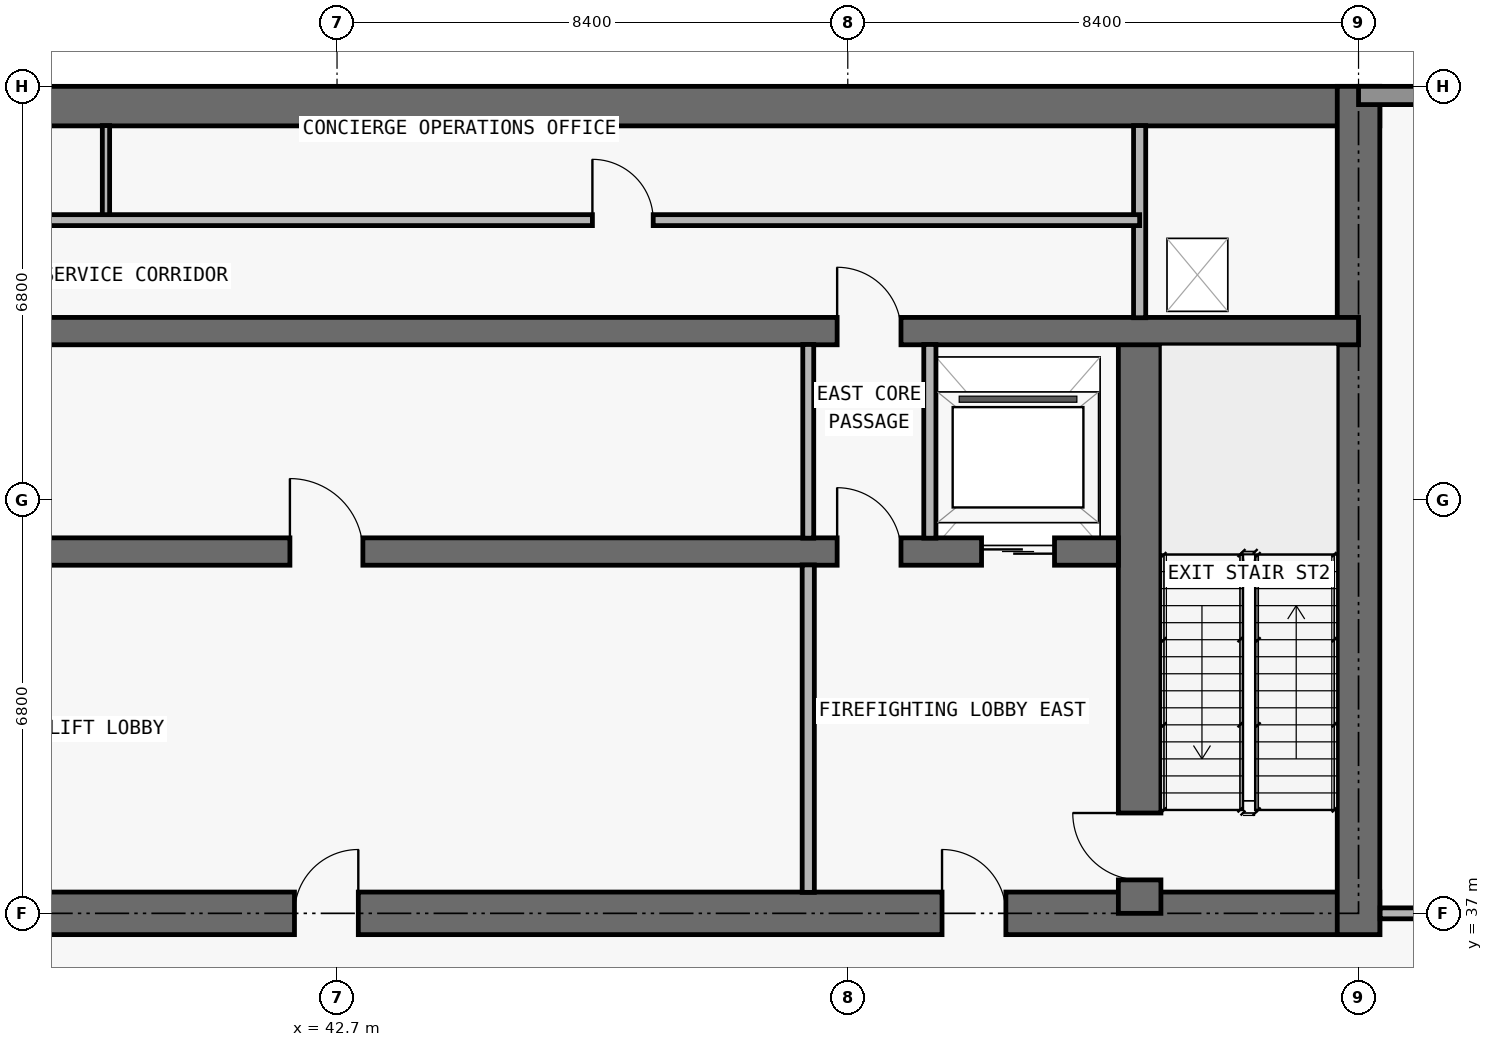
"""IFC4 building model, lengths in metres.
Left out: names, types, materials, properties, quantities, classifications, styles, units other than length and angle.
Written with IfcOpenShell. Run it as: python <this file> out.ifc"""

import sys

from ifc_helpers import new_model, si_unit, direction, frame, frame_2d, origin, place, context, subcontext, project, spatial, rectangle, extrude, element, fill, save


model = new_model("IFC4")
c1 = context("Model", 3, precision=1e-05, world=origin(), true_north=direction((0.0, 1.0)))
c2 = subcontext(c1, "Body", "Model", "MODEL_VIEW")
j1 = project(units=[si_unit("LENGTHUNIT", "METRE"), si_unit("PLANEANGLEUNIT", "RADIAN")], contexts=[c1])
p1 = place(None, origin())
s1 = spatial("IfcSite", under=j1, at=p1, CompositionType="ELEMENT")
p2 = place(p1, origin())
s2 = spatial("IfcBuilding", under=s1, at=p2, CompositionType="ELEMENT")
p3 = place(p2, frame((0.0, 0.0, 279.4)))
s3 = spatial("IfcBuildingStorey", under=s2, at=p3, CompositionType="ELEMENT", Elevation=279.4)
p4 = place(p3, frame((17.95, 37.0, 0.0), z_axis=(0.0, 0.0, 1.0), x_axis=(1.0, 0.0, 0.0)))
e1 = element("IfcWall", 1, at=p4, inside=s3, PredefinedType="SHEAR", context=c2, shape_type="SweptSolid", body=[
    extrude(rectangle(XDim=41.9, YDim=0.7, at=frame_2d((20.95, 0.0))), origin(), (0.0, 0.0, 1.0), 5.1),
])
p5 = place(p4, frame((14.312, 0.0, 0.0)))
e2 = element("IfcOpeningElement", 2, at=p5, cuts=e1, PredefinedType="OPENING", context=c2, shape_type="SweptSolid", body=[
    extrude(rectangle(XDim=1.2, YDim=2.2, at=frame_2d((0.6, 1.1))), frame((0.0, 0.36, 0.0), z_axis=(0.0, -1.0, 0.0), x_axis=(1.0, 0.0, 0.0)), (0.0, 0.0, 1.0), 0.72),
])
p6 = place(p4, frame((6.2, 0.0, 0.0)))
e3 = element("IfcOpeningElement", 3, at=p6, cuts=e1, PredefinedType="OPENING", context=c2, shape_type="SweptSolid", body=[
    extrude(rectangle(XDim=1.05, YDim=2.15, at=frame_2d((0.525, 1.075))), frame((0.0, 0.36, 0.0), z_axis=(0.0, -1.0, 0.0), x_axis=(1.0, 0.0, 0.0)), (0.0, 0.0, 1.0), 0.72),
])
p7 = place(p4, frame((34.7, 0.0, 0.0)))
e4 = element("IfcOpeningElement", 4, at=p7, cuts=e1, PredefinedType="OPENING", context=c2, shape_type="SweptSolid", body=[
    extrude(rectangle(XDim=1.05, YDim=2.15, at=frame_2d((0.525, 1.075))), frame((0.0, 0.36, 0.0), z_axis=(0.0, -1.0, 0.0), x_axis=(1.0, 0.0, 0.0)), (0.0, 0.0, 1.0), 0.72),
])
p8 = place(p4, frame((10.812, 0.0, 0.0)))
e5 = element("IfcOpeningElement", 5, at=p8, cuts=e1, PredefinedType="OPENING", context=c2, shape_type="SweptSolid", body=[
    extrude(rectangle(XDim=1.05, YDim=2.15, at=frame_2d((0.525, 1.075))), frame((0.0, 0.36, 0.0), z_axis=(0.0, -1.0, 0.0), x_axis=(1.0, 0.0, 0.0)), (0.0, 0.0, 1.0), 0.72),
])
p9 = place(p4, frame((24.05, 0.0, 0.0)))
e6 = element("IfcOpeningElement", 6, at=p9, cuts=e1, PredefinedType="OPENING", context=c2, shape_type="SweptSolid", body=[
    extrude(rectangle(XDim=1.05, YDim=2.15, at=frame_2d((0.525, 1.075))), frame((0.0, 0.36, 0.0), z_axis=(0.0, -1.0, 0.0), x_axis=(1.0, 0.0, 0.0)), (0.0, 0.0, 1.0), 0.72),
])
p10 = place(p3, frame((17.95, 50.275, 0.0), z_axis=(0.0, 0.0, 1.0), x_axis=(1.0, 0.0, 0.0)))
e7 = element("IfcWall", 7, at=p10, inside=s3, PredefinedType="SHEAR", context=c2, shape_type="SweptSolid", body=[
    extrude(rectangle(XDim=41.9, YDim=0.65, at=frame_2d((20.95, 0.0))), origin(), (0.0, 0.0, 1.0), 5.1),
])
p11 = place(p3, frame((59.5, 36.65, 0.0), z_axis=(0.0, 0.0, 1.0), x_axis=(0.0, 1.0, 0.0)))
e8 = element("IfcWall", 8, at=p11, inside=s3, PredefinedType="SHEAR", context=c2, shape_type="SweptSolid", body=[
    extrude(rectangle(XDim=13.95, YDim=0.7, at=frame_2d((6.975, 0.0))), origin(), (0.0, 0.0, 1.0), 5.1),
])
p12 = place(p3, frame((55.9, 37.0, 0.0), z_axis=(0.0, 0.0, 1.0), x_axis=(0.0, 1.0, 0.0)))
e9 = element("IfcWall", 9, at=p12, inside=s3, PredefinedType="SHEAR", context=c2, shape_type="SweptSolid", body=[
    extrude(rectangle(XDim=9.575, YDim=0.7, at=frame_2d((4.788, 0.0))), origin(), (0.0, 0.0, 1.0), 5.1),
])
p13 = place(p12, frame((0.55, 0.0, 0.0)))
e10 = element("IfcOpeningElement", 10, at=p13, cuts=e9, PredefinedType="OPENING", context=c2, shape_type="SweptSolid", body=[
    extrude(rectangle(XDim=1.1, YDim=2.15, at=frame_2d((0.55, 1.075))), frame((0.0, 0.36, 0.0), z_axis=(0.0, -1.0, 0.0), x_axis=(1.0, 0.0, 0.0)), (0.0, 0.0, 1.0), 0.72),
])
p14 = place(p3, frame((22.25, 42.95, 0.0), z_axis=(0.0, 0.0, 1.0), x_axis=(1.0, 0.0, 0.0)))
e11 = element("IfcWall", 11, at=p14, inside=s3, PredefinedType="SHEAR", context=c2, shape_type="SweptSolid", body=[
    extrude(rectangle(XDim=33.3, YDim=0.45, at=frame_2d((16.65, 0.0))), origin(), (0.0, 0.0, 1.0), 5.1),
])
p15 = place(p14, frame((1.05, 0.0, 0.0)))
e12 = element("IfcOpeningElement", 12, at=p15, cuts=e11, PredefinedType="OPENING", context=c2, shape_type="SweptSolid", body=[
    extrude(rectangle(XDim=1.2, YDim=2.2, at=frame_2d((0.6, 1.1))), frame((0.0, 0.235, 0.0), z_axis=(0.0, -1.0, 0.0), x_axis=(1.0, 0.0, 0.0)), (0.0, 0.0, 1.0), 0.47),
])
p16 = place(p14, frame((31.05, 0.0, 0.0)))
e13 = element("IfcOpeningElement", 13, at=p16, cuts=e11, PredefinedType="OPENING", context=c2, shape_type="SweptSolid", body=[
    extrude(rectangle(XDim=1.2, YDim=2.2, at=frame_2d((0.6, 1.1))), frame((0.0, 0.235, 0.0), z_axis=(0.0, -1.0, 0.0), x_axis=(1.0, 0.0, 0.0)), (0.0, 0.0, 1.0), 0.47),
])
p17 = place(p14, frame((3.625, 0.0, 0.0)))
e14 = element("IfcOpeningElement", 14, at=p17, cuts=e11, PredefinedType="OPENING", context=c2, shape_type="SweptSolid", body=[
    extrude(rectangle(XDim=1.05, YDim=2.15, at=frame_2d((0.525, 1.075))), frame((0.0, 0.235, 0.0), z_axis=(0.0, -1.0, 0.0), x_axis=(1.0, 0.0, 0.0)), (0.0, 0.0, 1.0), 0.47),
])
p18 = place(p14, frame((28.675, 0.0, 0.0)))
e15 = element("IfcOpeningElement", 15, at=p18, cuts=e11, PredefinedType="OPENING", context=c2, shape_type="SweptSolid", body=[
    extrude(rectangle(XDim=1.05, YDim=2.15, at=frame_2d((0.525, 1.075))), frame((0.0, 0.235, 0.0), z_axis=(0.0, -1.0, 0.0), x_axis=(1.0, 0.0, 0.0)), (0.0, 0.0, 1.0), 0.47),
])
p19 = place(p14, frame((6.538, 0.0, 0.0)))
e16 = element("IfcOpeningElement", 16, at=p19, cuts=e11, PredefinedType="OPENING", context=c2, shape_type="SweptSolid", body=[
    extrude(rectangle(XDim=1.0, YDim=2.2, at=frame_2d((0.5, 1.1))), frame((0.0, 0.235, 0.0), z_axis=(0.0, -1.0, 0.0), x_axis=(1.0, 0.0, 0.0)), (0.0, 0.0, 1.0), 0.47),
])
p20 = place(p14, frame((19.675, 0.0, 0.0)))
e17 = element("IfcOpeningElement", 17, at=p20, cuts=e11, PredefinedType="OPENING", context=c2, shape_type="SweptSolid", body=[
    extrude(rectangle(XDim=1.2, YDim=2.2, at=frame_2d((0.6, 1.1))), frame((0.0, 0.235, 0.0), z_axis=(0.0, -1.0, 0.0), x_axis=(1.0, 0.0, 0.0)), (0.0, 0.0, 1.0), 0.47),
])
p21 = place(p3, frame((18.3, 46.575, 0.0), z_axis=(0.0, 0.0, 1.0), x_axis=(1.0, 0.0, 0.0)))
e18 = element("IfcWall", 18, at=p21, inside=s3, PredefinedType="SHEAR", context=c2, shape_type="SweptSolid", body=[
    extrude(rectangle(XDim=41.2, YDim=0.45, at=frame_2d((20.6, 0.0))), origin(), (0.0, 0.0, 1.0), 5.1),
])
p22 = place(p21, frame((7.575, 0.0, 0.0)))
e19 = element("IfcOpeningElement", 19, at=p22, cuts=e18, PredefinedType="OPENING", context=c2, shape_type="SweptSolid", body=[
    extrude(rectangle(XDim=1.05, YDim=2.15, at=frame_2d((0.525, 1.075))), frame((0.0, 0.235, 0.0), z_axis=(0.0, -1.0, 0.0), x_axis=(1.0, 0.0, 0.0)), (0.0, 0.0, 1.0), 0.47),
])
p23 = place(p21, frame((32.625, 0.0, 0.0)))
e20 = element("IfcOpeningElement", 20, at=p23, cuts=e18, PredefinedType="OPENING", context=c2, shape_type="SweptSolid", body=[
    extrude(rectangle(XDim=1.05, YDim=2.15, at=frame_2d((0.525, 1.075))), frame((0.0, 0.235, 0.0), z_axis=(0.0, -1.0, 0.0), x_axis=(1.0, 0.0, 0.0)), (0.0, 0.0, 1.0), 0.47),
])
p24 = place(p3, frame((59.5, 50.45, 0.0), z_axis=(0.0, 0.0, 1.0), x_axis=(1.0, 0.0, 0.0)))
e21 = element("IfcWall", 21, at=p24, inside=s3, PredefinedType="STANDARD", context=c2, shape_type="SweptSolid", body=[
    extrude(rectangle(XDim=1.8, YDim=0.3, at=frame_2d((0.9, 0.0))), origin(), (0.0, 0.0, 1.0), 5.1),
])
p25 = place(p3, frame((38.9, 48.4, 0.0), z_axis=(0.0, 0.0, 1.0), x_axis=(0.0, 1.0, 0.0)))
e22 = element("IfcWall", 22, at=p25, inside=s3, PredefinedType="PARTITIONING", context=c2, shape_type="SweptSolid", body=[
    extrude(rectangle(XDim=1.555, YDim=0.12, at=frame_2d((0.778, 0.0))), origin(), (0.0, 0.0, 1.0), 5.1),
])
p26 = place(p3, frame((50.45, 37.345, 0.0), z_axis=(0.0, 0.0, 1.0), x_axis=(0.0, 1.0, 0.0)))
e23 = element("IfcWall", 23, at=p26, inside=s3, PredefinedType="PARTITIONING", context=c2, shape_type="SweptSolid", body=[
    extrude(rectangle(XDim=5.385, YDim=0.2, at=frame_2d((2.692, 0.0))), origin(), (0.0, 0.0, 1.0), 5.1),
])
p27 = place(p3, frame((50.45, 43.17, 0.0), z_axis=(0.0, 0.0, 1.0), x_axis=(0.0, 1.0, 0.0)))
e24 = element("IfcWall", 24, at=p27, inside=s3, PredefinedType="PARTITIONING", context=c2, shape_type="SweptSolid", body=[
    extrude(rectangle(XDim=3.185, YDim=0.18, at=frame_2d((1.593, 0.0))), origin(), (0.0, 0.0, 1.0), 5.1),
])
p28 = place(p3, frame((52.45, 43.17, 0.0), z_axis=(0.0, 0.0, 1.0), x_axis=(0.0, 1.0, 0.0)))
e25 = element("IfcWall", 25, at=p28, inside=s3, PredefinedType="PARTITIONING", context=c2, shape_type="SweptSolid", body=[
    extrude(rectangle(XDim=3.185, YDim=0.2, at=frame_2d((1.593, 0.0))), origin(), (0.0, 0.0, 1.0), 5.1),
])
p29 = place(p3, frame((55.9, 46.795, 0.0), z_axis=(0.0, 0.0, 1.0), x_axis=(0.0, 1.0, 0.0)))
e26 = element("IfcWall", 26, at=p29, inside=s3, PredefinedType="PARTITIONING", context=c2, shape_type="SweptSolid", body=[
    extrude(rectangle(XDim=3.16, YDim=0.2, at=frame_2d((1.58, 0.0))), origin(), (0.0, 0.0, 1.0), 5.1),
])
p30 = place(p3, frame((59.855, 37.0, 0.0), z_axis=(0.0, 0.0, 1.0), x_axis=(1.0, 0.0, 0.0)))
e27 = element("IfcWall", 27, at=p30, inside=s3, PredefinedType="PARTITIONING", context=c2, shape_type="SweptSolid", body=[
    extrude(rectangle(XDim=1.445, YDim=0.18, at=frame_2d((0.723, 0.0))), origin(), (0.0, 0.0, 1.0), 5.1),
])
p31 = place(p3, frame((21.9, 48.4, 0.0), z_axis=(0.0, 0.0, 1.0), x_axis=(1.0, 0.0, 0.0)))
e28 = element("IfcWall", 28, at=p31, inside=s3, PredefinedType="PARTITIONING", context=c2, shape_type="SweptSolid", body=[
    extrude(rectangle(XDim=34.0, YDim=0.18, at=frame_2d((17.0, 0.0))), origin(), (0.0, 0.0, 1.0), 5.1),
])
p32 = place(p31, frame((8.0, 0.0, 0.0)))
e29 = element("IfcOpeningElement", 29, at=p32, cuts=e28, PredefinedType="OPENING", context=c2, shape_type="SweptSolid", body=[
    extrude(rectangle(XDim=1.0, YDim=2.2, at=frame_2d((0.5, 1.1))), frame((0.0, 0.1, 0.0), z_axis=(0.0, -1.0, 0.0), x_axis=(1.0, 0.0, 0.0)), (0.0, 0.0, 1.0), 0.2),
])
p33 = place(p31, frame((25.0, 0.0, 0.0)))
e30 = element("IfcOpeningElement", 30, at=p33, cuts=e28, PredefinedType="OPENING", context=c2, shape_type="SweptSolid", body=[
    extrude(rectangle(XDim=1.0, YDim=2.2, at=frame_2d((0.5, 1.1))), frame((0.0, 0.1, 0.0), z_axis=(0.0, -1.0, 0.0), x_axis=(1.0, 0.0, 0.0)), (0.0, 0.0, 1.0), 0.2),
])
p34 = place(p16, origin())
e31 = element("IfcDoor", 31, at=p34, inside=s3, OperationType="DOUBLE_DOOR_SLIDING", PredefinedType="DOOR", context=c2, shape_type="SweptSolid", body=[
    extrude(rectangle(XDim=1.2, YDim=2.2, at=frame_2d((0.6, 1.1))), frame((0.0, 0.025, 0.0), z_axis=(0.0, -1.0, 0.0), x_axis=(1.0, 0.0, 0.0)), (0.0, 0.0, 1.0), 0.05),
])
fill(e13, e31)
p35 = place(p7, origin())
e32 = element("IfcDoor", 32, at=p35, inside=s3, OperationType="SINGLE_SWING_LEFT", PredefinedType="DOOR", context=c2, shape_type="SweptSolid", body=[
    extrude(rectangle(XDim=1.05, YDim=2.15, at=frame_2d((0.525, 1.075))), frame((0.0, 0.025, 0.0), z_axis=(0.0, -1.0, 0.0), x_axis=(1.0, 0.0, 0.0)), (0.0, 0.0, 1.0), 0.05),
])
fill(e4, e32)
p36 = place(p13, origin())
e33 = element("IfcDoor", 33, at=p36, inside=s3, OperationType="SINGLE_SWING_RIGHT", PredefinedType="DOOR", context=c2, shape_type="SweptSolid", body=[
    extrude(rectangle(XDim=1.1, YDim=2.15, at=frame_2d((0.55, 1.075))), frame((0.0, 0.025, 0.0), z_axis=(0.0, -1.0, 0.0), x_axis=(1.0, 0.0, 0.0)), (0.0, 0.0, 1.0), 0.05),
])
fill(e10, e33)
p37 = place(p18, origin())
e34 = element("IfcDoor", 34, at=p37, inside=s3, OperationType="SINGLE_SWING_LEFT", PredefinedType="DOOR", context=c2, shape_type="SweptSolid", body=[
    extrude(rectangle(XDim=1.05, YDim=2.15, at=frame_2d((0.525, 1.075))), frame((0.0, 0.025, 0.0), z_axis=(0.0, -1.0, 0.0), x_axis=(1.0, 0.0, 0.0)), (0.0, 0.0, 1.0), 0.05),
])
fill(e15, e34)
p38 = place(p9, origin())
e35 = element("IfcDoor", 35, at=p38, inside=s3, OperationType="SINGLE_SWING_RIGHT", PredefinedType="DOOR", context=c2, shape_type="SweptSolid", body=[
    extrude(rectangle(XDim=1.05, YDim=2.15, at=frame_2d((0.525, 1.075))), frame((0.0, 0.025, 0.0), z_axis=(0.0, -1.0, 0.0), x_axis=(1.0, 0.0, 0.0)), (0.0, 0.0, 1.0), 0.05),
])
fill(e6, e35)
p39 = place(p20, origin())
e36 = element("IfcDoor", 36, at=p39, inside=s3, OperationType="SINGLE_SWING_LEFT", PredefinedType="DOOR", context=c2, shape_type="SweptSolid", body=[
    extrude(rectangle(XDim=1.2, YDim=2.2, at=frame_2d((0.6, 1.1))), frame((0.0, 0.025, 0.0), z_axis=(0.0, -1.0, 0.0), x_axis=(1.0, 0.0, 0.0)), (0.0, 0.0, 1.0), 0.05),
])
fill(e17, e36)
p40 = place(p23, origin())
e37 = element("IfcDoor", 37, at=p40, inside=s3, OperationType="SINGLE_SWING_LEFT", PredefinedType="DOOR", context=c2, shape_type="SweptSolid", body=[
    extrude(rectangle(XDim=1.05, YDim=2.15, at=frame_2d((0.525, 1.075))), frame((0.0, 0.025, 0.0), z_axis=(0.0, -1.0, 0.0), x_axis=(1.0, 0.0, 0.0)), (0.0, 0.0, 1.0), 0.05),
])
fill(e20, e37)
p41 = place(p33, origin())
e38 = element("IfcDoor", 38, at=p41, inside=s3, OperationType="SINGLE_SWING_LEFT", PredefinedType="DOOR", context=c2, shape_type="SweptSolid", body=[
    extrude(rectangle(XDim=1.0, YDim=2.2, at=frame_2d((0.5, 1.1))), frame((0.0, 0.025, 0.0), z_axis=(0.0, -1.0, 0.0), x_axis=(1.0, 0.0, 0.0)), (0.0, 0.0, 1.0), 0.05),
])
fill(e30, e38)
save(model, sys.argv[1])
